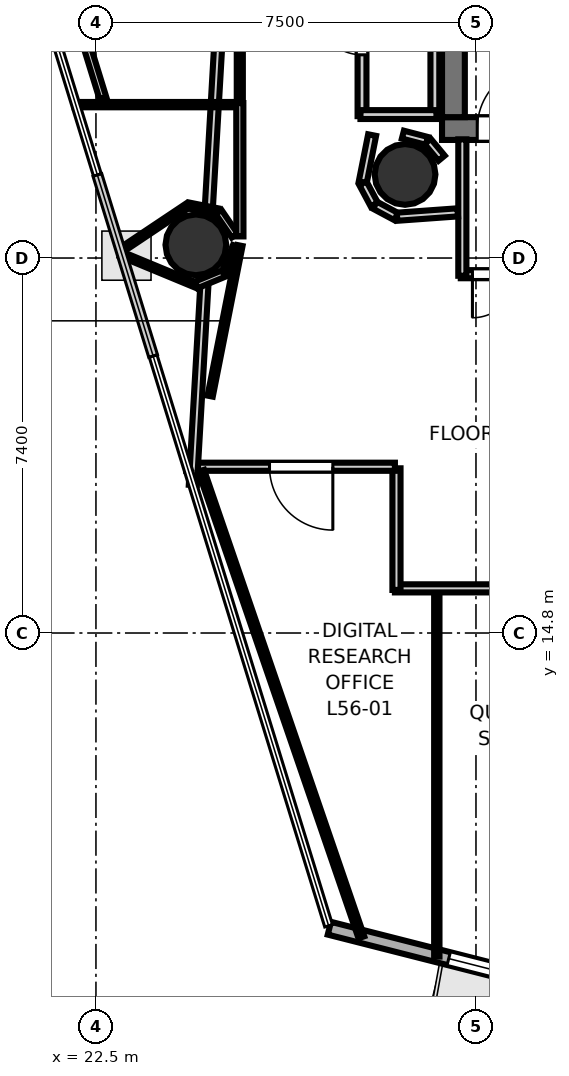
"""IFC4 building model, lengths in metres.
Left out: names, types, materials, properties, quantities, classifications, styles, units other than length and angle.
Written with IfcOpenShell. Run it as: python <this file> out.ifc"""

import sys

from ifc_helpers import new_model, si_unit, direction, frame, frame_2d, origin, origin_2d, place, context, subcontext, project, spatial, rectangle, hollow_circle, extrude, element, fill, save


model = new_model("IFC4")
c1 = context("Model", 3, precision=1e-05, world=origin(), true_north=direction((0.0, 1.0)))
c2 = subcontext(c1, "Body", "Model", "MODEL_VIEW")
j1 = project(units=[si_unit("LENGTHUNIT", "METRE"), si_unit("PLANEANGLEUNIT", "RADIAN")], contexts=[c1])
p1 = place(None, origin())
s1 = spatial("IfcSite", under=j1, at=p1, CompositionType="ELEMENT")
p2 = place(p1, origin())
s2 = spatial("IfcBuilding", under=s1, at=p2, CompositionType="ELEMENT")
p3 = place(p2, frame((0.0, 0.0, 218.8)))
s3 = spatial("IfcBuildingStorey", under=s2, at=p3, CompositionType="ELEMENT", Elevation=218.8)
p4 = place(p3, frame((29.33, 24.755, 0.0), z_axis=(0.0, 0.0, 1.0), x_axis=(1.0, 0.0, 0.0)))
e1 = element("IfcWall", 1, at=p4, inside=s3, PredefinedType="SHEAR", context=c2, shape_type="SweptSolid", body=[
    extrude(rectangle(XDim=10.52, YDim=0.45, at=frame_2d((5.26, 0.0))), origin(), (0.0, 0.0, 1.0), 3.52),
])
p5 = place(p4, frame((0.695, 0.0, 0.0)))
e2 = element("IfcOpeningElement", 2, at=p5, cuts=e1, PredefinedType="OPENING", context=c2, shape_type="SweptSolid", body=[
    extrude(rectangle(XDim=1.25, YDim=2.15, at=frame_2d((0.625, 1.075))), frame((0.0, 0.235, 0.0), z_axis=(0.0, -1.0, 0.0), x_axis=(1.0, 0.0, 0.0)), (0.0, 0.0, 1.0), 0.47),
])
p6 = place(p3, frame((29.555, 24.98, 0.0), z_axis=(0.0, 0.0, 1.0), x_axis=(0.0, 1.0, 0.0)))
e3 = element("IfcWall", 3, at=p6, inside=s3, PredefinedType="SHEAR", context=c2, shape_type="SweptSolid", body=[
    extrude(rectangle(XDim=7.44, YDim=0.45, at=frame_2d((3.72, 0.0))), origin(), (0.0, 0.0, 1.0), 3.52),
])
for number, where, z_axis, x_axis in (
    (4, (28.6, 23.85, 0.0), (0.0, 0.0, 1.0), (1.0, 0.0, 0.0)),
    (5, (24.472, 22.46, 0.0), (0.0, 0.0, 1.0), (1.0, 0.0, 0.0)),
):
    element("IfcColumn", number, at=place(p3, frame(where, z_axis=z_axis, x_axis=x_axis)), inside=s3, PredefinedType="COLUMN", context=c2, shape_type="SweptSolid", body=[
        extrude(hollow_circle(Radius=0.6, WallThickness=0.03, at=origin_2d()), origin(), (0.0, 0.0, 1.0), 3.7),
    ])
p7 = place(p3, frame((27.107, 8.974, 0.0), z_axis=(0.0, 0.0, 1.0), x_axis=(0.969158794911, -0.246437071577, 0.0)))
e6 = element("IfcWall", 6, at=p7, inside=s3, PredefinedType="SOLIDWALL", context=c2, shape_type="SweptSolid", body=[
    extrude(rectangle(XDim=6.902, YDim=0.26, at=frame_2d((3.451, 0.0))), origin(), (0.0, 0.0, 1.0), 3.52),
])
p8 = place(p7, frame((2.431, 0.0, 0.9)))
e7 = element("IfcOpeningElement", 7, at=p8, cuts=e6, PredefinedType="OPENING", context=c2, shape_type="SweptSolid", body=[
    extrude(rectangle(XDim=1.2, YDim=2.0, at=frame_2d((0.6, 1.0))), frame((0.0, 0.14, 0.0), z_axis=(0.0, -1.0, 0.0), x_axis=(1.0, 0.0, 0.0)), (0.0, 0.0, 1.0), 0.28),
])
p9 = place(p7, frame((4.231, 0.0, 0.9)))
e8 = element("IfcOpeningElement", 8, at=p9, cuts=e6, PredefinedType="OPENING", context=c2, shape_type="SweptSolid", body=[
    extrude(rectangle(XDim=1.2, YDim=2.0, at=frame_2d((0.6, 1.0))), frame((0.0, 0.14, 0.0), z_axis=(0.0, -1.0, 0.0), x_axis=(1.0, 0.0, 0.0)), (0.0, 0.0, 1.0), 0.28),
])
p10 = place(p3, frame((33.45, 21.881, 0.0), z_axis=(0.0, 0.0, 1.0), x_axis=(-1.0, 0.0, 0.0)))
e9 = element("IfcWall", 9, at=p10, inside=s3, PredefinedType="PARTITIONING", context=c2, shape_type="SweptSolid", body=[
    extrude(rectangle(XDim=3.75, YDim=0.16, at=frame_2d((1.875, 0.0))), origin(), (0.0, 0.0, 1.0), 2.84),
])
p11 = place(p10, frame((1.275, 0.0, 0.0)))
e10 = element("IfcOpeningElement", 10, at=p11, cuts=e9, PredefinedType="OPENING", context=c2, shape_type="SweptSolid", body=[
    extrude(rectangle(XDim=1.2, YDim=2.15, at=frame_2d((0.6, 1.075))), frame((0.0, 0.09, 0.0), z_axis=(0.0, -1.0, 0.0), x_axis=(1.0, 0.0, 0.0)), (0.0, 0.0, 1.0), 0.18),
])
p12 = place(p10, frame((2.66, 0.0, 0.0)))
e11 = element("IfcOpeningElement", 11, at=p12, cuts=e9, PredefinedType="OPENING", context=c2, shape_type="SweptSolid", body=[
    extrude(rectangle(XDim=0.86, YDim=2.05, at=frame_2d((0.43, 1.025))), frame((0.0, 0.09, 0.0), z_axis=(0.0, -1.0, 0.0), x_axis=(1.0, 0.0, 0.0)), (0.0, 0.0, 1.0), 0.18),
])
p13 = place(p3, frame((29.731, 21.85, 0.0), z_axis=(0.0, 0.0, 1.0), x_axis=(0.0, 1.0, 0.0)))
e12 = element("IfcWall", 12, at=p13, inside=s3, PredefinedType="PARTITIONING", context=c2, shape_type="SweptSolid", body=[
    extrude(rectangle(XDim=2.692, YDim=0.16, at=frame_2d((1.346, 0.0))), origin(), (0.0, 0.0, 1.0), 2.84),
])
p14 = place(p3, frame((27.751, 25.0, 0.0), z_axis=(0.0, 0.0, 1.0), x_axis=(0.0, 1.0, 0.0)))
e13 = element("IfcWall", 13, at=p14, inside=s3, PredefinedType="PLUMBINGWALL", context=c2, shape_type="SweptSolid", body=[
    extrude(rectangle(XDim=3.32, YDim=0.175, at=frame_2d((1.66, 0.0))), origin(), (0.0, 0.0, 1.0), 2.84),
])
p15 = place(p14, frame((1.21, 0.0, 0.0)))
e14 = element("IfcOpeningElement", 14, at=p15, cuts=e13, PredefinedType="OPENING", context=c2, shape_type="SweptSolid", body=[
    extrude(rectangle(XDim=0.9, YDim=2.1, at=frame_2d((0.45, 1.05))), frame((0.0, 0.097, 0.0), z_axis=(0.0, -1.0, 0.0), x_axis=(1.0, 0.0, 0.0)), (0.0, 0.0, 1.0), 0.195),
])
p16 = place(p3, frame((29.189, 28.32, 0.0), z_axis=(0.0, 0.0, 1.0), x_axis=(0.0, -1.0, 0.0)))
e15 = element("IfcWall", 15, at=p16, inside=s3, PredefinedType="PLUMBINGWALL", context=c2, shape_type="SweptSolid", body=[
    extrude(rectangle(XDim=3.32, YDim=0.175, at=frame_2d((1.66, 0.0))), origin(), (0.0, 0.0, 1.0), 2.84),
])
p17 = place(p3, frame((29.22, 25.031, 0.0), z_axis=(0.0, 0.0, 1.0), x_axis=(-1.0, 0.0, 0.0)))
e16 = element("IfcWall", 16, at=p17, inside=s3, PredefinedType="PLUMBINGWALL", context=c2, shape_type="SweptSolid", body=[
    extrude(rectangle(XDim=1.5, YDim=0.175, at=frame_2d((0.75, 0.0))), origin(), (0.0, 0.0, 1.0), 2.84),
])
p18 = place(p3, frame((29.321, 24.17, 0.0), z_axis=(0.0, 0.0, 1.0), x_axis=(-0.638008265708, 0.770029514296, 0.0)))
e17 = element("IfcWall", 17, at=p18, inside=s3, PredefinedType="PARTITIONING", context=c2, shape_type="SweptSolid", body=[
    extrude(rectangle(XDim=0.431, YDim=0.16, at=frame_2d((0.215, 0.0))), origin(), (0.0, 0.0, 1.0), 2.84),
])
p19 = place(p3, frame((29.03, 24.512, 0.0), z_axis=(0.0, 0.0, 1.0), x_axis=(-0.967681003213, 0.252177469296, 0.0)))
e18 = element("IfcWall", 18, at=p19, inside=s3, PredefinedType="PARTITIONING", context=c2, shape_type="SweptSolid", body=[
    extrude(rectangle(XDim=0.488, YDim=0.16, at=frame_2d((0.244, 0.0))), origin(), (0.0, 0.0, 1.0), 2.84),
])
p20 = place(p3, frame((27.95, 24.626, 0.0), z_axis=(0.0, 0.0, 1.0), x_axis=(-0.195125950178, -0.980778192848, 0.0)))
e19 = element("IfcWall", 19, at=p20, inside=s3, PredefinedType="PARTITIONING", context=c2, shape_type="SweptSolid", body=[
    extrude(rectangle(XDim=0.948, YDim=0.16, at=frame_2d((0.474, 0.0))), origin(), (0.0, 0.0, 1.0), 2.84),
])
for number, where, z_axis, x_axis in (
    (20, (27.768, 23.675, 0.0), (0.0, 0.0, 1.0), (0.472, -0.882, 0.0)),
    (21, (28.006, 23.243, 0.0), (0.0, 0.0, 1.0), (0.882, -0.472, 0.0)),
):
    element("IfcWall", number, at=place(p3, frame(where, z_axis=z_axis, x_axis=x_axis)), inside=s3, PredefinedType="PARTITIONING", context=c2, shape_type="SweptSolid", body=[
        extrude(rectangle(XDim=0.476, YDim=0.16, at=frame_2d((0.238, 0.0))), origin(), (0.0, 0.0, 1.0), 2.84),
    ])
p21 = place(p3, frame((28.442, 23.015, 0.0), z_axis=(0.0, 0.0, 1.0), x_axis=(0.99740683837, 0.07196942943, 0.0)))
e22 = element("IfcWall", 22, at=p21, inside=s3, PredefinedType="PARTITIONING", context=c2, shape_type="SweptSolid", body=[
    extrude(rectangle(XDim=1.201, YDim=0.16, at=frame_2d((0.601, 0.0))), origin(), (0.0, 0.0, 1.0), 2.84),
])
p22 = place(p3, frame((43.328, 15.681, 0.0), z_axis=(0.0, 0.0, 1.0), x_axis=(-1.0, 0.0, 0.0)))
e23 = element("IfcWall", 23, at=p22, inside=s3, PredefinedType="PARTITIONING", context=c2, shape_type="SweptSolid", body=[
    extrude(rectangle(XDim=14.928, YDim=0.16, at=frame_2d((7.464, 0.0))), origin(), (0.0, 0.0, 1.0), 2.84),
])
p23 = place(p22, frame((3.157, 0.0, 0.0)))
e24 = element("IfcOpeningElement", 24, at=p23, cuts=e23, PredefinedType="OPENING", context=c2, shape_type="SweptSolid", body=[
    extrude(rectangle(XDim=1.25, YDim=2.2, at=frame_2d((0.625, 1.1))), frame((0.0, 0.09, 0.0), z_axis=(0.0, -1.0, 0.0), x_axis=(1.0, 0.0, 0.0)), (0.0, 0.0, 1.0), 0.18),
])
p24 = place(p22, frame((9.727, 0.0, 0.0)))
e25 = element("IfcOpeningElement", 25, at=p24, cuts=e23, PredefinedType="OPENING", context=c2, shape_type="SweptSolid", body=[
    extrude(rectangle(XDim=1.25, YDim=2.2, at=frame_2d((0.625, 1.1))), frame((0.0, 0.09, 0.0), z_axis=(0.0, -1.0, 0.0), x_axis=(1.0, 0.0, 0.0)), (0.0, 0.0, 1.0), 0.18),
])
p25 = place(p3, frame((28.431, 15.65, 0.0), z_axis=(0.0, 0.0, 1.0), x_axis=(0.0, 1.0, 0.0)))
e26 = element("IfcWall", 26, at=p25, inside=s3, PredefinedType="PARTITIONING", context=c2, shape_type="SweptSolid", body=[
    extrude(rectangle(XDim=2.4, YDim=0.16, at=frame_2d((1.2, 0.0))), origin(), (0.0, 0.0, 1.0), 2.84),
])
p26 = place(p3, frame((28.4, 18.081, 0.0), z_axis=(0.0, 0.0, 1.0), x_axis=(-1.0, 0.0, 0.0)))
e27 = element("IfcWall", 27, at=p26, inside=s3, PredefinedType="PARTITIONING", context=c2, shape_type="SweptSolid", body=[
    extrude(rectangle(XDim=4.118, YDim=0.16, at=frame_2d((2.059, 0.0))), origin(), (0.0, 0.0, 1.0), 2.84),
])
p27 = place(p26, frame((1.225, 0.0, 0.0)))
e28 = element("IfcOpeningElement", 28, at=p27, cuts=e27, PredefinedType="OPENING", context=c2, shape_type="SweptSolid", body=[
    extrude(rectangle(XDim=1.25, YDim=2.2, at=frame_2d((0.625, 1.1))), frame((0.0, 0.09, 0.0), z_axis=(0.0, -1.0, 0.0), x_axis=(1.0, 0.0, 0.0)), (0.0, 0.0, 1.0), 0.18),
])
p28 = place(p3, frame((24.413, 17.721, 0.0), z_axis=(0.0, 0.0, 1.0), x_axis=(0.057505607696, 0.998345183333, 0.0)))
e29 = element("IfcWall", 29, at=p28, inside=s3, PredefinedType="PARTITIONING", context=c2, shape_type="SweptSolid", body=[
    extrude(rectangle(XDim=18.578, YDim=0.16, at=frame_2d((9.289, 0.0))), origin(), (0.0, 0.0, 1.0), 2.84),
])
p29 = place(p28, frame((15.461, 0.0, 0.0)))
e30 = element("IfcOpeningElement", 30, at=p29, cuts=e29, PredefinedType="OPENING", context=c2, shape_type="SweptSolid", body=[
    extrude(rectangle(XDim=1.25, YDim=2.2, at=frame_2d((0.625, 1.1))), frame((0.0, 0.09, 0.0), z_axis=(0.0, -1.0, 0.0), x_axis=(1.0, 0.0, 0.0)), (0.0, 0.0, 1.0), 0.18),
])
p30 = place(p28, frame((12.002, 0.0, 0.0)))
e31 = element("IfcOpeningElement", 31, at=p30, cuts=e29, PredefinedType="OPENING", context=c2, shape_type="SweptSolid", body=[
    extrude(rectangle(XDim=1.25, YDim=2.2, at=frame_2d((0.625, 1.1))), frame((0.0, 0.09, 0.0), z_axis=(0.0, -1.0, 0.0), x_axis=(1.0, 0.0, 0.0)), (0.0, 0.0, 1.0), 0.18),
])
p31 = place(p3, frame((25.238, 22.644, 0.0), z_axis=(0.0, 0.0, 1.0), x_axis=(-0.563363697458, 0.826209019792, 0.0)))
e32 = element("IfcWall", 32, at=p31, inside=s3, PredefinedType="PARTITIONING", context=c2, shape_type="SweptSolid", body=[
    extrude(rectangle(XDim=0.564, YDim=0.14, at=frame_2d((0.282, 0.0))), origin(), (0.0, 0.0, 1.0), 2.84),
])
p32 = place(p3, frame((24.9, 23.122, 0.0), z_axis=(0.0, 0.0, 1.0), x_axis=(-0.980773892286, 0.195147565217, 0.0)))
e33 = element("IfcWall", 33, at=p32, inside=s3, PredefinedType="PARTITIONING", context=c2, shape_type="SweptSolid", body=[
    extrude(rectangle(XDim=0.582, YDim=0.12, at=frame_2d((0.291, 0.0))), origin(), (0.0, 0.0, 1.0), 2.84),
])
p33 = place(p3, frame((24.306, 23.231, 0.0), z_axis=(0.0, 0.0, 1.0), x_axis=(-0.831395340196, -0.555681373001, 0.0)))
e34 = element("IfcWall", 34, at=p33, inside=s3, PredefinedType="PARTITIONING", context=c2, shape_type="SweptSolid", body=[
    extrude(rectangle(XDim=1.607, YDim=0.105, at=frame_2d((0.804, 0.0))), origin(), (0.0, 0.0, 1.0), 2.84),
])
p34 = place(p3, frame((22.992, 22.279, 0.0), z_axis=(0.0, 0.0, 1.0), x_axis=(0.923915716711, -0.382596064296, 0.0)))
e35 = element("IfcWall", 35, at=p34, inside=s3, PredefinedType="PARTITIONING", context=c2, shape_type="SweptSolid", body=[
    extrude(rectangle(XDim=1.589, YDim=0.105, at=frame_2d((0.794, 0.0))), origin(), (0.0, 0.0, 1.0), 2.84),
])
p35 = place(p3, frame((24.484, 21.671, 0.0), z_axis=(0.0, 0.0, 1.0), x_axis=(0.923832639322, 0.382796622927, 0.0)))
e36 = element("IfcWall", 36, at=p35, inside=s3, PredefinedType="PARTITIONING", context=c2, shape_type="SweptSolid", body=[
    extrude(rectangle(XDim=0.582, YDim=0.14, at=frame_2d((0.291, 0.0))), origin(), (0.0, 0.0, 1.0), 2.84),
])
p36 = place(p3, frame((25.038, 21.91, 0.0), z_axis=(0.0, 0.0, 1.0), x_axis=(0.389093528864, 0.921198255424, 0.0)))
e37 = element("IfcWall", 37, at=p36, inside=s3, PredefinedType="PARTITIONING", context=c2, shape_type="SweptSolid", body=[
    extrude(rectangle(XDim=0.568, YDim=0.12, at=frame_2d((0.284, 0.0))), origin(), (0.0, 0.0, 1.0), 2.84),
])
p37 = place(p3, frame((25.341, 22.446, 0.0), z_axis=(0.0, 0.0, 1.0), x_axis=(-0.193914741689, -0.981018385636, 0.0)))
e38 = element("IfcWall", 38, at=p37, inside=s3, PredefinedType="PARTITIONING", context=c2, shape_type="SweptSolid", body=[
    extrude(rectangle(XDim=3.029, YDim=0.105, at=frame_2d((1.515, 0.0))), origin(), (0.0, 0.0, 1.0), 2.84),
])
p38 = place(p3, frame((29.227, 15.57, 0.0), z_axis=(0.0, 0.0, 1.0), x_axis=(0.0, -1.0, 0.0)))
e39 = element("IfcWall", 39, at=p38, inside=s3, PredefinedType="PARTITIONING", context=c2, shape_type="SweptSolid", body=[
    extrude(rectangle(XDim=7.155, YDim=0.105, at=frame_2d((3.578, 0.0))), origin(), (0.0, 0.0, 1.0), 2.84),
])
p39 = place(p3, frame((27.738, 8.796, 0.0), z_axis=(0.0, 0.0, 1.0), x_axis=(-0.324764257493, 0.945794997373, 0.0)))
e40 = element("IfcWall", 40, at=p39, inside=s3, PredefinedType="PARTITIONING", context=c2, shape_type="SweptSolid", body=[
    extrude(rectangle(XDim=9.732, YDim=0.12, at=frame_2d((4.866, 0.0))), origin(), (0.0, 0.0, 1.0), 2.84),
])
p40 = place(p3, frame((22.08, 25.227, 0.0), z_axis=(0.0, 0.0, 1.0), x_axis=(1.0, 0.0, 0.0)))
e41 = element("IfcWall", 41, at=p40, inside=s3, PredefinedType="PARTITIONING", context=c2, shape_type="SweptSolid", body=[
    extrude(rectangle(XDim=3.29, YDim=0.105, at=frame_2d((1.645, 0.0))), origin(), (0.0, 0.0, 1.0), 2.84),
])
p41 = place(p3, frame((25.339, 25.258, 0.0), z_axis=(0.0, 0.0, 1.0), x_axis=(0.00083495657, -0.999999651424, 0.0)))
e42 = element("IfcWall", 42, at=p41, inside=s3, PredefinedType="PARTITIONING", context=c2, shape_type="SweptSolid", body=[
    extrude(rectangle(XDim=2.632, YDim=0.14, at=frame_2d((1.316, 0.0))), origin(), (0.0, 0.0, 1.0), 2.84),
])
p42 = place(p3, frame((25.339, 29.631, 0.0), z_axis=(0.0, 0.0, 1.0), x_axis=(0.0, -1.0, 0.0)))
e43 = element("IfcWall", 43, at=p42, inside=s3, PredefinedType="PARTITIONING", context=c2, shape_type="SweptSolid", body=[
    extrude(rectangle(XDim=4.289, YDim=0.12, at=frame_2d((2.144, 0.0))), origin(), (0.0, 0.0, 1.0), 2.84),
])
p43 = place(p3, frame((22.639, 25.351, 0.0), z_axis=(0.0, 0.0, 1.0), x_axis=(-0.29437082852, 0.955691276154, 0.0)))
e44 = element("IfcWall", 44, at=p43, inside=s3, PredefinedType="PARTITIONING", context=c2, shape_type="SweptSolid", body=[
    extrude(rectangle(XDim=6.923, YDim=0.14, at=frame_2d((3.461, 0.0))), origin(), (0.0, 0.0, 1.0), 2.84),
])
p44 = place(p5, origin())
e45 = element("IfcDoor", 45, at=p44, inside=s3, OperationType="SINGLE_SWING_RIGHT", PredefinedType="DOOR", context=c2, shape_type="SweptSolid", body=[
    extrude(rectangle(XDim=1.25, YDim=2.15, at=frame_2d((0.625, 1.075))), frame((0.0, 0.025, 0.0), z_axis=(0.0, -1.0, 0.0), x_axis=(1.0, 0.0, 0.0)), (0.0, 0.0, 1.0), 0.05),
])
fill(e2, e45)
p45 = place(p15, origin())
e46 = element("IfcDoor", 46, at=p45, inside=s3, OperationType="SINGLE_SWING_RIGHT", PredefinedType="DOOR", context=c2, shape_type="SweptSolid", body=[
    extrude(rectangle(XDim=0.9, YDim=2.1, at=frame_2d((0.45, 1.05))), frame((0.0, 0.025, 0.0), z_axis=(0.0, -1.0, 0.0), x_axis=(1.0, 0.0, 0.0)), (0.0, 0.0, 1.0), 0.05),
])
fill(e14, e46)
p46 = place(p12, origin())
e47 = element("IfcDoor", 47, at=p46, inside=s3, OperationType="SINGLE_SWING_RIGHT", PredefinedType="DOOR", context=c2, shape_type="SweptSolid", body=[
    extrude(rectangle(XDim=0.86, YDim=2.05, at=frame_2d((0.43, 1.025))), frame((0.0, 0.025, 0.0), z_axis=(0.0, -1.0, 0.0), x_axis=(1.0, 0.0, 0.0)), (0.0, 0.0, 1.0), 0.05),
])
fill(e11, e47)
p47 = place(p27, origin())
e48 = element("IfcDoor", 48, at=p47, inside=s3, OperationType="SINGLE_SWING_LEFT", PredefinedType="DOOR", context=c2, shape_type="SweptSolid", body=[
    extrude(rectangle(XDim=1.25, YDim=2.2, at=frame_2d((0.625, 1.1))), frame((0.0, 0.025, 0.0), z_axis=(0.0, -1.0, 0.0), x_axis=(1.0, 0.0, 0.0)), (0.0, 0.0, 1.0), 0.05),
])
fill(e28, e48)
p48 = place(p8, origin())
e49 = element("IfcWindow", 49, at=p48, inside=s3, PartitioningType="SINGLE_PANEL", PredefinedType="WINDOW", context=c2, shape_type="SweptSolid", body=[
    extrude(rectangle(XDim=1.2, YDim=2.0, at=frame_2d((0.6, 1.0))), frame((0.0, 0.03, 0.0), z_axis=(0.0, -1.0, 0.0), x_axis=(1.0, 0.0, 0.0)), (0.0, 0.0, 1.0), 0.06),
])
fill(e7, e49)
save(model, sys.argv[1])
